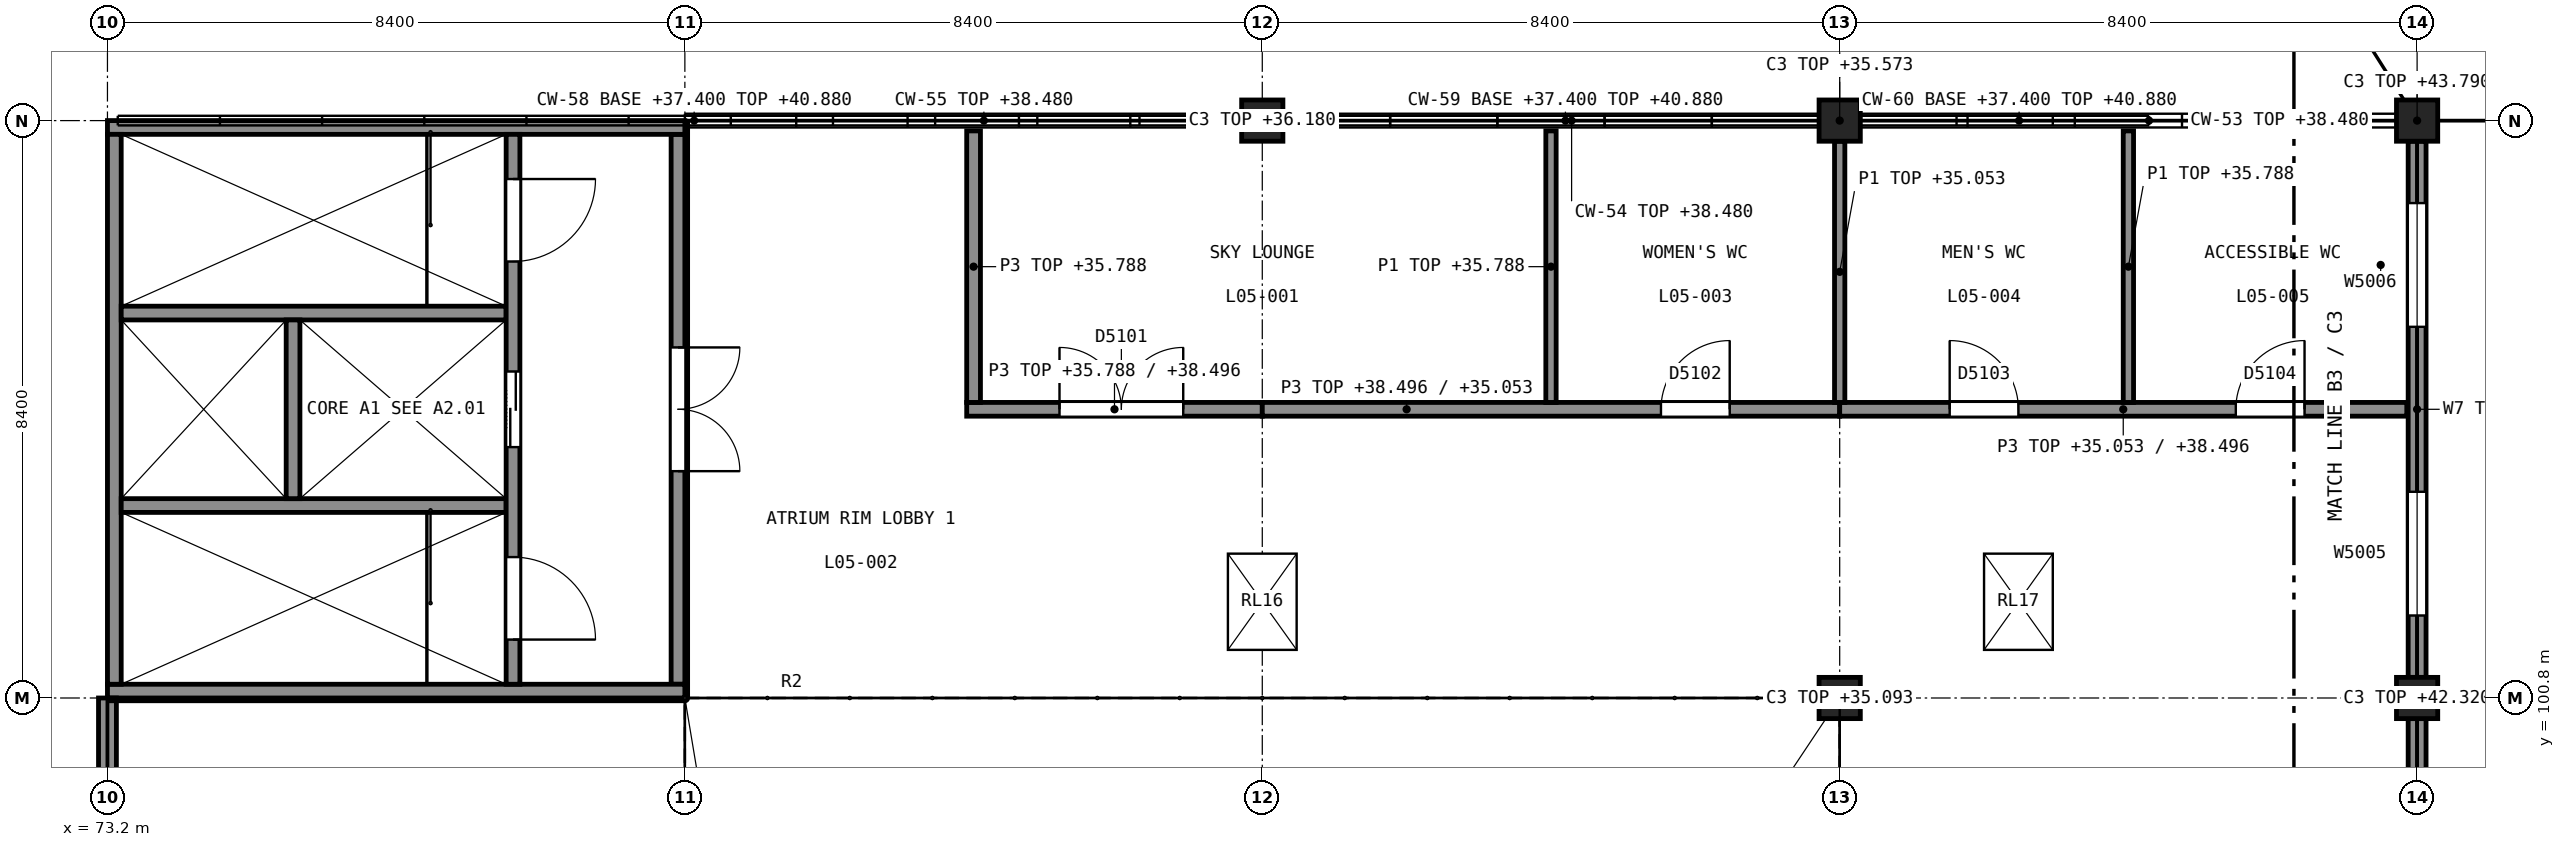
"""IFC4 building model, lengths in metres.
Left out: names, types, materials, properties, quantities, classifications, styles, units other than length and angle.
Written with IfcOpenShell. Run it as: python <this file> out.ifc"""

import sys

from ifc_helpers import new_model, si_unit, direction, frame, frame_2d, origin, origin_2d, place, context, subcontext, project, spatial, polyline, rectangle, outline, extrude, element, fill, save


model = new_model("IFC4")
c1 = context("Model", 3, precision=1e-05, world=origin(), true_north=direction((0.0, 1.0)))
c2 = subcontext(c1, "Body", "Model", "MODEL_VIEW")
j1 = project(units=[si_unit("LENGTHUNIT", "METRE"), si_unit("PLANEANGLEUNIT", "RADIAN")], contexts=[c1])
p1 = place(None, origin())
s1 = spatial("IfcSite", under=j1, at=p1, CompositionType="ELEMENT")
p2 = place(p1, origin())
s2 = spatial("IfcBuilding", under=s1, at=p2, CompositionType="ELEMENT")
p3 = place(p2, frame((0.0, 0.0, 30.0)))
s3 = spatial("IfcBuildingStorey", under=s2, at=p3, CompositionType="ELEMENT", Elevation=30.0)
for number, where, z_axis, x_axis in (
    (1, (73.2, 100.9, 0.0), (0.0, 0.0, 1.0), (1.0, 0.0, 0.0)),
    (2, (73.2, 109.1, 0.0), (0.0, 0.0, 1.0), (1.0, 0.0, 0.0)),
):
    element("IfcWall", number, at=place(p3, frame(where, z_axis=z_axis, x_axis=x_axis)), inside=s3, PredefinedType="SHEAR", context=c2, shape_type="SweptSolid", body=[
        extrude(rectangle(XDim=8.4, YDim=0.2, at=frame_2d((4.2, 0.0))), origin(), (0.0, 0.0, 1.0), 12.38),
    ])
p4 = place(p3, frame((73.3, 101.0, 0.0), z_axis=(0.0, 0.0, 1.0), x_axis=(0.0, 1.0, 0.0)))
e3 = element("IfcWall", 3, at=p4, inside=s3, PredefinedType="SHEAR", context=c2, shape_type="SweptSolid", body=[
    extrude(rectangle(XDim=8.0, YDim=0.2, at=frame_2d((4.0, 0.0))), origin(), (0.0, 0.0, 1.0), 12.38),
])
p5 = place(p3, frame((81.5, 101.0, 0.0), z_axis=(0.0, 0.0, 1.0), x_axis=(0.0, 1.0, 0.0)))
e4 = element("IfcWall", 4, at=p5, inside=s3, PredefinedType="SHEAR", context=c2, shape_type="SweptSolid", body=[
    extrude(rectangle(XDim=8.0, YDim=0.2, at=frame_2d((4.0, 0.0))), origin(), (0.0, 0.0, 1.0), 12.38),
])
p6 = place(p5, frame((3.1, 0.0, 0.0)))
e5 = element("IfcOpeningElement", 5, at=p6, cuts=e4, PredefinedType="OPENING", context=c2, shape_type="SweptSolid", body=[
    extrude(rectangle(XDim=1.8, YDim=2.1, at=frame_2d((0.9, 1.05))), frame((0.0, 0.11, 0.0), z_axis=(0.0, -1.0, 0.0), x_axis=(1.0, 0.0, 0.0)), (0.0, 0.0, 1.0), 0.22),
])
p7 = place(p3, frame((79.1, 101.0, 0.0), z_axis=(0.0, 0.0, 1.0), x_axis=(0.0, 1.0, 0.0)))
e6 = element("IfcWall", 6, at=p7, inside=s3, PredefinedType="SHEAR", context=c2, shape_type="SweptSolid", body=[
    extrude(rectangle(XDim=8.0, YDim=0.2, at=frame_2d((4.0, 0.0))), origin(), (0.0, 0.0, 1.0), 12.38),
])
p8 = place(p7, frame((0.65, 0.0, 0.0)))
e7 = element("IfcOpeningElement", 7, at=p8, cuts=e6, PredefinedType="OPENING", context=c2, shape_type="SweptSolid", body=[
    extrude(rectangle(XDim=1.2, YDim=2.1, at=frame_2d((0.6, 1.05))), frame((0.0, 0.11, 0.0), z_axis=(0.0, -1.0, 0.0), x_axis=(1.0, 0.0, 0.0)), (0.0, 0.0, 1.0), 0.22),
])
p9 = place(p7, frame((6.15, 0.0, 0.0)))
e8 = element("IfcOpeningElement", 8, at=p9, cuts=e6, PredefinedType="OPENING", context=c2, shape_type="SweptSolid", body=[
    extrude(rectangle(XDim=1.2, YDim=2.1, at=frame_2d((0.6, 1.05))), frame((0.0, 0.11, 0.0), z_axis=(0.0, -1.0, 0.0), x_axis=(1.0, 0.0, 0.0)), (0.0, 0.0, 1.0), 0.22),
])
p10 = place(p7, frame((3.45, 0.0, 0.0)))
e9 = element("IfcOpeningElement", 9, at=p10, cuts=e6, PredefinedType="OPENING", context=c2, shape_type="SweptSolid", body=[
    extrude(rectangle(XDim=1.1, YDim=2.1, at=frame_2d((0.55, 1.05))), frame((0.0, 0.11, 0.0), z_axis=(0.0, -1.0, 0.0), x_axis=(1.0, 0.0, 0.0)), (0.0, 0.0, 1.0), 0.22),
])
for number, where, z_axis, x_axis in (
    (10, (73.4, 103.6, 0.0), (0.0, 0.0, 1.0), (1.0, 0.0, 0.0)),
    (11, (73.4, 106.4, 0.0), (0.0, 0.0, 1.0), (1.0, 0.0, 0.0)),
):
    element("IfcWall", number, at=place(p3, frame(where, z_axis=z_axis, x_axis=x_axis)), inside=s3, PredefinedType="SHEAR", context=c2, shape_type="SweptSolid", body=[
        extrude(rectangle(XDim=5.6, YDim=0.2, at=frame_2d((2.8, 0.0))), origin(), (0.0, 0.0, 1.0), 12.38),
    ])
p11 = place(p3, frame((75.9, 103.7, 0.0), z_axis=(0.0, 0.0, 1.0), x_axis=(0.0, 1.0, 0.0)))
e12 = element("IfcWall", 12, at=p11, inside=s3, PredefinedType="SHEAR", context=c2, shape_type="SweptSolid", body=[
    extrude(rectangle(XDim=2.6, YDim=0.2, at=frame_2d((1.3, 0.0))), origin(), (0.0, 0.0, 1.0), 12.38),
])
p12 = place(p3, frame((90.0, 109.2, 0.0), z_axis=(0.0, 0.0, 1.0), x_axis=(1.0, 0.0, 0.0)))
e13 = element("IfcColumn", 13, at=p12, inside=s3, PredefinedType="COLUMN", context=c2, shape_type="SweptSolid", body=[
    extrude(rectangle(XDim=0.6, YDim=0.6, at=origin_2d()), origin(), (0.0, 0.0, 1.0), 6.18),
])
p13 = place(p3, frame((98.4, 100.8, 0.0), z_axis=(0.0, 0.0, 1.0), x_axis=(1.0, 0.0, 0.0)))
e14 = element("IfcColumn", 14, at=p13, inside=s3, PredefinedType="COLUMN", context=c2, shape_type="SweptSolid", body=[
    extrude(rectangle(XDim=0.6, YDim=0.6, at=origin_2d()), origin(), (0.0, 0.0, 1.0), 5.093),
])
p14 = place(p3, frame((98.4, 109.2, 0.0), z_axis=(0.0, 0.0, 1.0), x_axis=(1.0, 0.0, 0.0)))
e15 = element("IfcColumn", 15, at=p14, inside=s3, PredefinedType="COLUMN", context=c2, shape_type="SweptSolid", body=[
    extrude(rectangle(XDim=0.6, YDim=0.6, at=origin_2d()), origin(), (0.0, 0.0, 1.0), 5.573),
])
p15 = place(p3, frame((106.8, 100.8, 0.0), z_axis=(0.0, 0.0, 1.0), x_axis=(1.0, 0.0, 0.0)))
e16 = element("IfcColumn", 16, at=p15, inside=s3, PredefinedType="COLUMN", context=c2, shape_type="SweptSolid", body=[
    extrude(rectangle(XDim=0.6, YDim=0.6, at=origin_2d()), origin(), (0.0, 0.0, 1.0), 12.32),
])
p16 = place(p3, frame((106.8, 109.2, 0.0), z_axis=(0.0, 0.0, 1.0), x_axis=(1.0, 0.0, 0.0)))
e17 = element("IfcColumn", 17, at=p16, inside=s3, PredefinedType="COLUMN", context=c2, shape_type="SweptSolid", body=[
    extrude(rectangle(XDim=0.6, YDim=0.6, at=origin_2d()), origin(), (0.0, 0.0, 1.0), 13.79),
])
p17 = place(p3, frame((106.8, 92.7, 0.0), z_axis=(0.0, 0.0, 1.0), x_axis=(0.0, 1.0, 0.0)))
e18 = element("IfcWall", 18, at=p17, inside=s3, PredefinedType="SOLIDWALL", context=c2, shape_type="SweptSolid", body=[
    extrude(outline(polyline([(0.0, 0.0), (7.8, 0.0), (7.8, 4.603), (2.501, 3.938), (2.499, 4.603), (0.0, 4.603), (0.0, 0.0)])), frame((0.0, 0.13, 0.0), z_axis=(0.0, -1.0, 0.0), x_axis=(1.0, 0.0, 0.0)), (0.0, 0.0, 1.0), 0.26),
])
p18 = place(p17, frame((0.9, 0.0, 0.9)))
e19 = element("IfcOpeningElement", 19, at=p18, cuts=e18, PredefinedType="OPENING", context=c2, shape_type="SweptSolid", body=[
    extrude(rectangle(XDim=1.8, YDim=2.7, at=frame_2d((0.9, 1.35))), frame((0.0, 0.14, 0.0), z_axis=(0.0, -1.0, 0.0), x_axis=(1.0, 0.0, 0.0)), (0.0, 0.0, 1.0), 0.28),
])
p19 = place(p17, frame((5.1, 0.0, 0.9)))
e20 = element("IfcOpeningElement", 20, at=p19, cuts=e18, PredefinedType="OPENING", context=c2, shape_type="SweptSolid", body=[
    extrude(rectangle(XDim=1.8, YDim=2.7, at=frame_2d((0.9, 1.35))), frame((0.0, 0.14, 0.0), z_axis=(0.0, -1.0, 0.0), x_axis=(1.0, 0.0, 0.0)), (0.0, 0.0, 1.0), 0.28),
])
p20 = place(p3, frame((106.8, 101.1, 0.0), z_axis=(0.0, 0.0, 1.0), x_axis=(0.0, 1.0, 0.0)))
e21 = element("IfcWall", 21, at=p20, inside=s3, PredefinedType="SOLIDWALL", context=c2, shape_type="SweptSolid", body=[
    extrude(outline(polyline([(0.0, 0.0), (7.8, 0.0), (7.8, 5.083), (0.0, 5.083), (0.0, 0.0)])), frame((0.0, 0.13, 0.0), z_axis=(0.0, -1.0, 0.0), x_axis=(1.0, 0.0, 0.0)), (0.0, 0.0, 1.0), 0.26),
])
p21 = place(p20, frame((0.9, 0.0, 0.9)))
e22 = element("IfcOpeningElement", 22, at=p21, cuts=e21, PredefinedType="OPENING", context=c2, shape_type="SweptSolid", body=[
    extrude(rectangle(XDim=1.8, YDim=2.7, at=frame_2d((0.9, 1.35))), frame((0.0, 0.14, 0.0), z_axis=(0.0, -1.0, 0.0), x_axis=(1.0, 0.0, 0.0)), (0.0, 0.0, 1.0), 0.28),
])
p22 = place(p20, frame((5.1, 0.0, 0.9)))
e23 = element("IfcOpeningElement", 23, at=p22, cuts=e21, PredefinedType="OPENING", context=c2, shape_type="SweptSolid", body=[
    extrude(rectangle(XDim=1.8, YDim=2.7, at=frame_2d((0.9, 1.35))), frame((0.0, 0.14, 0.0), z_axis=(0.0, -1.0, 0.0), x_axis=(1.0, 0.0, 0.0)), (0.0, 0.0, 1.0), 0.28),
])
p23 = place(p3, frame((73.2, 92.4, 0.0), z_axis=(0.0, 0.0, 1.0), x_axis=(0.0, 1.0, 0.0)))
e24 = element("IfcWall", 24, at=p23, inside=s3, PredefinedType="SOLIDWALL", context=c2, shape_type="SweptSolid", body=[
    extrude(outline(polyline([(0.0, 0.0), (8.4, 0.0), (8.4, 4.603), (2.801, 3.938), (2.799, 4.603), (0.0, 4.603), (0.0, 0.0)])), frame((0.0, 0.13, 0.0), z_axis=(0.0, -1.0, 0.0), x_axis=(1.0, 0.0, 0.0)), (0.0, 0.0, 1.0), 0.26),
])
p24 = place(p23, frame((1.2, 0.0, 0.9)))
e25 = element("IfcOpeningElement", 25, at=p24, cuts=e24, PredefinedType="OPENING", context=c2, shape_type="SweptSolid", body=[
    extrude(rectangle(XDim=1.8, YDim=2.7, at=frame_2d((0.9, 1.35))), frame((0.0, 0.14, 0.0), z_axis=(0.0, -1.0, 0.0), x_axis=(1.0, 0.0, 0.0)), (0.0, 0.0, 1.0), 0.28),
])
p25 = place(p23, frame((5.4, 0.0, 0.9)))
e26 = element("IfcOpeningElement", 26, at=p25, cuts=e24, PredefinedType="OPENING", context=c2, shape_type="SweptSolid", body=[
    extrude(rectangle(XDim=1.8, YDim=2.7, at=frame_2d((0.9, 1.35))), frame((0.0, 0.14, 0.0), z_axis=(0.0, -1.0, 0.0), x_axis=(1.0, 0.0, 0.0)), (0.0, 0.0, 1.0), 0.28),
])
p26 = place(p2, frame((0.0, 0.0, 25.0)))
s4 = spatial("IfcBuildingStorey", under=s2, at=p26, CompositionType="ELEMENT", Elevation=25.0)
p27 = place(p26, frame((107.1, 100.8, 0.0), z_axis=(0.0, 0.0, 1.0), x_axis=(1.0, 0.0, 0.0)))
e27 = element("IfcWall", 27, at=p27, inside=s4, PredefinedType="PARTITIONING", context=c2, shape_type="SweptSolid", body=[
    extrude(rectangle(XDim=8.1, YDim=0.2, at=frame_2d((4.05, 0.0))), origin(), (0.0, 0.0, 1.0), 17.27),
])
p28 = place(p27, frame((4.675, 0.0, 0.0)))
e28 = element("IfcOpeningElement", 28, at=p28, cuts=e27, PredefinedType="OPENING", context=c2, shape_type="SweptSolid", body=[
    extrude(rectangle(XDim=2.4, YDim=2.4, at=frame_2d((1.2, 1.2))), frame((0.0, 0.11, 0.0), z_axis=(0.0, -1.0, 0.0), x_axis=(1.0, 0.0, 0.0)), (0.0, 0.0, 1.0), 0.22),
])
p29 = place(p3, frame((85.7, 105.0, 0.0), z_axis=(0.0, 0.0, 1.0), x_axis=(1.0, 0.0, 0.0)))
e29 = element("IfcWall", 29, at=p29, inside=s3, PredefinedType="PARTITIONING", context=c2, shape_type="SweptSolid", body=[
    extrude(outline(polyline([(0.0, 0.0), (4.3, 0.0), (4.3, 8.496), (1.05, 8.496), (0.0, 5.788), (0.0, 0.0)])), frame((0.0, 0.1, 0.0), z_axis=(0.0, -1.0, 0.0), x_axis=(1.0, 0.0, 0.0)), (0.0, 0.0, 1.0), 0.2),
])
p30 = place(p29, frame((1.35, 0.0, 0.0)))
e30 = element("IfcOpeningElement", 30, at=p30, cuts=e29, PredefinedType="OPENING", context=c2, shape_type="SweptSolid", body=[
    extrude(rectangle(XDim=1.8, YDim=2.1, at=frame_2d((0.9, 1.05))), frame((0.0, 0.11, 0.0), z_axis=(0.0, -1.0, 0.0), x_axis=(1.0, 0.0, 0.0)), (0.0, 0.0, 1.0), 0.22),
])
p31 = place(p3, frame((90.0, 105.0, 0.0), z_axis=(0.0, 0.0, 1.0), x_axis=(1.0, 0.0, 0.0)))
e31 = element("IfcWall", 31, at=p31, inside=s3, PredefinedType="PARTITIONING", context=c2, shape_type="SweptSolid", body=[
    extrude(outline(polyline([(0.0, 0.0), (8.4, 0.0), (8.4, 5.053), (7.35, 8.496), (5.25, 8.496), (4.2, 5.788), (3.15, 8.496), (0.0, 8.496), (0.0, 0.0)])), frame((0.0, 0.1, 0.0), z_axis=(0.0, -1.0, 0.0), x_axis=(1.0, 0.0, 0.0)), (0.0, 0.0, 1.0), 0.2),
])
p32 = place(p31, frame((5.8, 0.0, 0.0)))
e32 = element("IfcOpeningElement", 32, at=p32, cuts=e31, PredefinedType="OPENING", context=c2, shape_type="SweptSolid", body=[
    extrude(rectangle(XDim=1.0, YDim=2.1, at=frame_2d((0.5, 1.05))), frame((0.0, 0.11, 0.0), z_axis=(0.0, -1.0, 0.0), x_axis=(1.0, 0.0, 0.0)), (0.0, 0.0, 1.0), 0.22),
])
p33 = place(p3, frame((98.4, 105.0, 0.0), z_axis=(0.0, 0.0, 1.0), x_axis=(1.0, 0.0, 0.0)))
e33 = element("IfcWall", 33, at=p33, inside=s3, PredefinedType="PARTITIONING", context=c2, shape_type="SweptSolid", body=[
    extrude(outline(polyline([(0.0, 0.0), (8.25, 0.0), (8.25, 8.496), (5.25, 8.496), (4.2, 5.788), (3.15, 8.496), (1.05, 8.496), (0.0, 5.053), (0.0, 0.0)])), frame((0.0, 0.1, 0.0), z_axis=(0.0, -1.0, 0.0), x_axis=(1.0, 0.0, 0.0)), (0.0, 0.0, 1.0), 0.2),
])
p34 = place(p33, frame((1.6, 0.0, 0.0)))
e34 = element("IfcOpeningElement", 34, at=p34, cuts=e33, PredefinedType="OPENING", context=c2, shape_type="SweptSolid", body=[
    extrude(rectangle(XDim=1.0, YDim=2.1, at=frame_2d((0.5, 1.05))), frame((0.0, 0.11, 0.0), z_axis=(0.0, -1.0, 0.0), x_axis=(1.0, 0.0, 0.0)), (0.0, 0.0, 1.0), 0.22),
])
p35 = place(p33, frame((5.762, 0.0, 0.0)))
e35 = element("IfcOpeningElement", 35, at=p35, cuts=e33, PredefinedType="OPENING", context=c2, shape_type="SweptSolid", body=[
    extrude(rectangle(XDim=1.0, YDim=2.1, at=frame_2d((0.5, 1.05))), frame((0.0, 0.11, 0.0), z_axis=(0.0, -1.0, 0.0), x_axis=(1.0, 0.0, 0.0)), (0.0, 0.0, 1.0), 0.22),
])
p36 = place(p3, frame((85.8, 105.1, 0.0), z_axis=(0.0, 0.0, 1.0), x_axis=(0.0, 1.0, 0.0)))
e36 = element("IfcWall", 36, at=p36, inside=s3, PredefinedType="PARTITIONING", context=c2, shape_type="SweptSolid", body=[
    extrude(rectangle(XDim=3.95, YDim=0.2, at=frame_2d((1.975, 0.0))), origin(), (0.0, 0.0, 1.0), 5.788),
])
p37 = place(p3, frame((94.2, 105.1, 0.0), z_axis=(0.0, 0.0, 1.0), x_axis=(0.0, 1.0, 0.0)))
e37 = element("IfcWall", 37, at=p37, inside=s3, PredefinedType="PARTITIONING", context=c2, shape_type="SweptSolid", body=[
    extrude(rectangle(XDim=3.95, YDim=0.15, at=frame_2d((1.975, 0.0))), origin(), (0.0, 0.0, 1.0), 5.788),
])
p38 = place(p3, frame((98.4, 105.1, 0.0), z_axis=(0.0, 0.0, 1.0), x_axis=(0.0, 1.0, 0.0)))
e38 = element("IfcWall", 38, at=p38, inside=s3, PredefinedType="PARTITIONING", context=c2, shape_type="SweptSolid", body=[
    extrude(rectangle(XDim=3.8, YDim=0.15, at=frame_2d((1.9, 0.0))), origin(), (0.0, 0.0, 1.0), 5.053),
])
p39 = place(p3, frame((102.6, 105.1, 0.0), z_axis=(0.0, 0.0, 1.0), x_axis=(0.0, 1.0, 0.0)))
e39 = element("IfcWall", 39, at=p39, inside=s3, PredefinedType="PARTITIONING", context=c2, shape_type="SweptSolid", body=[
    extrude(rectangle(XDim=3.95, YDim=0.15, at=frame_2d((1.975, 0.0))), origin(), (0.0, 0.0, 1.0), 5.788),
])
p40 = place(p21, origin())
e40 = element("IfcWindow", 40, at=p40, inside=s3, PartitioningType="SINGLE_PANEL", PredefinedType="WINDOW", context=c2, shape_type="SweptSolid", body=[
    extrude(rectangle(XDim=1.8, YDim=2.7, at=frame_2d((0.9, 1.35))), frame((0.0, 0.11, 0.0), z_axis=(0.0, -1.0, 0.0), x_axis=(1.0, 0.0, 0.0)), (0.0, 0.0, 1.0), 0.06),
])
fill(e22, e40)
p41 = place(p22, origin())
e41 = element("IfcWindow", 41, at=p41, inside=s3, PartitioningType="SINGLE_PANEL", PredefinedType="WINDOW", context=c2, shape_type="SweptSolid", body=[
    extrude(rectangle(XDim=1.8, YDim=2.7, at=frame_2d((0.9, 1.35))), frame((0.0, 0.11, 0.0), z_axis=(0.0, -1.0, 0.0), x_axis=(1.0, 0.0, 0.0)), (0.0, 0.0, 1.0), 0.06),
])
fill(e23, e41)
p42 = place(p3, frame((106.8, 109.2, 10.88), z_axis=(-1.046364e-06, -0.292359863187, 0.956308376203), x_axis=(1e-12, -0.956308376204, -0.292359863187)))
p43 = place(p42, frame((7.32, -16.8, 0.01), z_axis=(0.0, 0.0, -1.0), x_axis=(3.422656e-06, 0.999999999994, 0.0)))
p44 = place(p43, frame((0.0, 0.0, 0.01)))
e42 = element("IfcWindow", 42, at=p44, inside=s3, PartitioningType="SINGLE_PANEL", PredefinedType="SKYLIGHT", context=c2, shape_type="SweptSolid", body=[
    extrude(rectangle(XDim=1.0, YDim=1.4, at=origin_2d()), origin(), (0.0, 0.0, 1.0), 0.05),
])
p45 = place(p42, frame((7.32, -5.8, 0.01), z_axis=(0.0, 0.0, -1.0), x_axis=(3.422656e-06, 0.999999999994, 0.0)))
p46 = place(p45, frame((0.0, 0.0, 0.01)))
e43 = element("IfcWindow", 43, at=p46, inside=s3, PartitioningType="SINGLE_PANEL", PredefinedType="SKYLIGHT", context=c2, shape_type="SweptSolid", body=[
    extrude(rectangle(XDim=1.0, YDim=1.4, at=origin_2d()), origin(), (0.0, 0.0, 1.0), 0.05),
])
p47 = place(p30, origin())
e44 = element("IfcDoor", 44, at=p47, inside=s3, OperationType="DOUBLE_DOOR_SINGLE_SWING", PredefinedType="DOOR", context=c2, shape_type="SweptSolid", body=[
    extrude(rectangle(XDim=1.8, YDim=2.1, at=frame_2d((0.9, 1.05))), frame((0.0, 0.025, 0.0), z_axis=(0.0, -1.0, 0.0), x_axis=(1.0, 0.0, 0.0)), (0.0, 0.0, 1.0), 0.05),
])
fill(e30, e44)
p48 = place(p32, origin())
e45 = element("IfcDoor", 45, at=p48, inside=s3, OperationType="SINGLE_SWING_LEFT", PredefinedType="DOOR", context=c2, shape_type="SweptSolid", body=[
    extrude(rectangle(XDim=1.0, YDim=2.1, at=frame_2d((0.5, 1.05))), frame((0.0, 0.025, 0.0), z_axis=(0.0, -1.0, 0.0), x_axis=(1.0, 0.0, 0.0)), (0.0, 0.0, 1.0), 0.05),
])
fill(e32, e45)
p49 = place(p34, origin())
e46 = element("IfcDoor", 46, at=p49, inside=s3, OperationType="SINGLE_SWING_RIGHT", PredefinedType="DOOR", context=c2, shape_type="SweptSolid", body=[
    extrude(rectangle(XDim=1.0, YDim=2.1, at=frame_2d((0.5, 1.05))), frame((0.0, 0.025, 0.0), z_axis=(0.0, -1.0, 0.0), x_axis=(1.0, 0.0, 0.0)), (0.0, 0.0, 1.0), 0.05),
])
fill(e34, e46)
p50 = place(p35, origin())
e47 = element("IfcDoor", 47, at=p50, inside=s3, OperationType="SINGLE_SWING_LEFT", PredefinedType="DOOR", context=c2, shape_type="SweptSolid", body=[
    extrude(rectangle(XDim=1.0, YDim=2.1, at=frame_2d((0.5, 1.05))), frame((0.0, 0.025, 0.0), z_axis=(0.0, -1.0, 0.0), x_axis=(1.0, 0.0, 0.0)), (0.0, 0.0, 1.0), 0.05),
])
fill(e35, e47)
p51 = place(p6, origin())
e48 = element("IfcDoor", 48, at=p51, inside=s3, OperationType="DOUBLE_DOOR_SINGLE_SWING", PredefinedType="DOOR", context=c2, shape_type="SweptSolid", body=[
    extrude(rectangle(XDim=1.8, YDim=2.1, at=frame_2d((0.9, 1.05))), frame((0.0, 0.025, 0.0), z_axis=(0.0, -1.0, 0.0), x_axis=(1.0, 0.0, 0.0)), (0.0, 0.0, 1.0), 0.05),
])
fill(e5, e48)
p52 = place(p8, origin())
e49 = element("IfcDoor", 49, at=p52, inside=s3, OperationType="SINGLE_SWING_LEFT", PredefinedType="DOOR", context=c2, shape_type="SweptSolid", body=[
    extrude(rectangle(XDim=1.2, YDim=2.1, at=frame_2d((0.6, 1.05))), frame((0.0, 0.025, 0.0), z_axis=(0.0, -1.0, 0.0), x_axis=(1.0, 0.0, 0.0)), (0.0, 0.0, 1.0), 0.05),
])
fill(e7, e49)
p53 = place(p9, origin())
e50 = element("IfcDoor", 50, at=p53, inside=s3, OperationType="SINGLE_SWING_RIGHT", PredefinedType="DOOR", context=c2, shape_type="SweptSolid", body=[
    extrude(rectangle(XDim=1.2, YDim=2.1, at=frame_2d((0.6, 1.05))), frame((0.0, 0.025, 0.0), z_axis=(0.0, -1.0, 0.0), x_axis=(1.0, 0.0, 0.0)), (0.0, 0.0, 1.0), 0.05),
])
fill(e8, e50)
p54 = place(p10, origin())
e51 = element("IfcDoor", 51, at=p54, inside=s3, OperationType="DOUBLE_DOOR_SLIDING", PredefinedType="DOOR", context=c2, shape_type="SweptSolid", body=[
    extrude(rectangle(XDim=1.1, YDim=2.1, at=frame_2d((0.55, 1.05))), frame((0.0, 0.025, 0.0), z_axis=(0.0, -1.0, 0.0), x_axis=(1.0, 0.0, 0.0)), (0.0, 0.0, 1.0), 0.05),
])
fill(e9, e51)
save(model, sys.argv[1])
